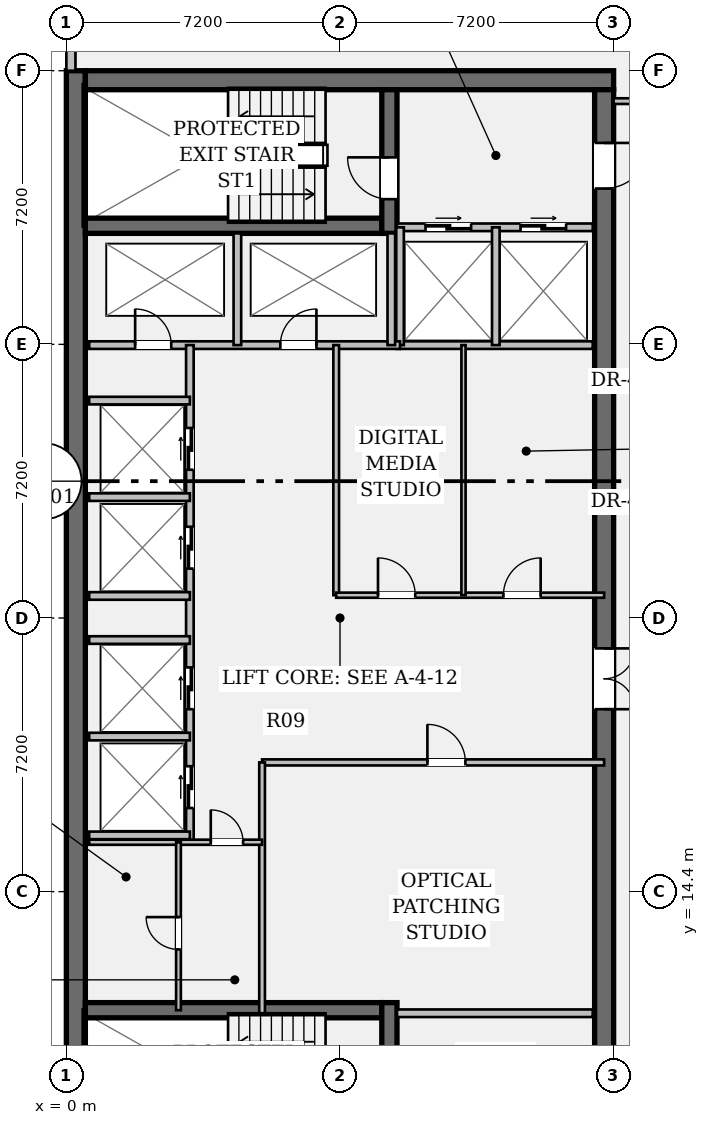
"""IFC4 building model, lengths in metres.
Left out: names, types, materials, properties, quantities, classifications, styles, units other than length and angle.
Written with IfcOpenShell. Run it as: python <this file> out.ifc"""

import sys

from ifc_helpers import new_model, si_unit, direction, frame, frame_2d, origin, place, context, subcontext, project, spatial, rectangle, extrude, element, fill, save


model = new_model("IFC4")
c1 = context("Model", 3, precision=1e-05, world=origin(), true_north=direction((0.0, 1.0)))
c2 = subcontext(c1, "Body", "Model", "MODEL_VIEW")
j1 = project(units=[si_unit("LENGTHUNIT", "METRE"), si_unit("PLANEANGLEUNIT", "RADIAN")], contexts=[c1])
p1 = place(None, origin())
s1 = spatial("IfcSite", under=j1, at=p1, CompositionType="ELEMENT")
p2 = place(p1, origin())
s2 = spatial("IfcBuilding", under=s1, at=p2, CompositionType="ELEMENT")
p3 = place(p2, frame((0.0, 0.0, 190.75)))
s3 = spatial("IfcBuildingStorey", under=s2, at=p3, CompositionType="ELEMENT", Elevation=190.75)
p4 = place(p3, frame((0.25, 7.2, 0.0), z_axis=(0.0, 0.0, 1.0), x_axis=(0.0, 1.0, 0.0)))
e1 = element("IfcWall", 1, at=p4, inside=s3, PredefinedType="SHEAR", context=c2, shape_type="SweptSolid", body=[
    extrude(rectangle(XDim=28.8, YDim=0.5, at=frame_2d((14.4, 0.0))), origin(), (0.0, 0.0, 1.0), 3.24),
])
p5 = place(p3, frame((0.5, 35.75, 0.0), z_axis=(0.0, 0.0, 1.0), x_axis=(1.0, 0.0, 0.0)))
e2 = element("IfcWall", 2, at=p5, inside=s3, PredefinedType="SHEAR", context=c2, shape_type="SweptSolid", body=[
    extrude(rectangle(XDim=13.9, YDim=0.5, at=frame_2d((6.95, 0.0))), origin(), (0.0, 0.0, 1.0), 3.24),
])
p6 = place(p3, frame((14.15, 35.5, 0.0), z_axis=(0.0, 0.0, 1.0), x_axis=(0.0, -1.0, 0.0)))
e3 = element("IfcWall", 3, at=p6, inside=s3, PredefinedType="SHEAR", context=c2, shape_type="SweptSolid", body=[
    extrude(rectangle(XDim=27.8, YDim=0.5, at=frame_2d((13.9, 0.0))), origin(), (0.0, 0.0, 1.0), 3.24),
])
p7 = place(p6, frame((1.4, 0.0, 0.0)))
e4 = element("IfcOpeningElement", 4, at=p7, cuts=e3, PredefinedType="OPENING", context=c2, shape_type="SweptSolid", body=[
    extrude(rectangle(XDim=1.2, YDim=2.15, at=frame_2d((0.6, 1.075))), frame((0.0, 0.262, 0.0), z_axis=(0.0, -1.0, 0.0), x_axis=(1.0, 0.0, 0.0)), (0.0, 0.0, 1.0), 0.524),
])
p8 = place(p6, frame((25.35, 0.0, 0.0)))
e5 = element("IfcOpeningElement", 5, at=p8, cuts=e3, PredefinedType="OPENING", context=c2, shape_type="SweptSolid", body=[
    extrude(rectangle(XDim=1.2, YDim=2.15, at=frame_2d((0.6, 1.075))), frame((0.0, 0.262, 0.0), z_axis=(0.0, -1.0, 0.0), x_axis=(1.0, 0.0, 0.0)), (0.0, 0.0, 1.0), 0.524),
])
p9 = place(p6, frame((14.7, 0.0, 0.0)))
e6 = element("IfcOpeningElement", 6, at=p9, cuts=e3, PredefinedType="OPENING", context=c2, shape_type="SweptSolid", body=[
    extrude(rectangle(XDim=1.6, YDim=2.2, at=frame_2d((0.8, 1.1))), frame((0.0, 0.262, 0.0), z_axis=(0.0, -1.0, 0.0), x_axis=(1.0, 0.0, 0.0)), (0.0, 0.0, 1.0), 0.524),
])
for number, where, z_axis, x_axis in (
    (7, (0.5, 31.92, 0.0), (0.0, 0.0, 1.0), (1.0, 0.0, 0.0)),
    (8, (0.5, 11.28, 0.0), (0.0, 0.0, 1.0), (1.0, 0.0, 0.0)),
):
    element("IfcWall", number, at=place(p3, frame(where, z_axis=z_axis, x_axis=x_axis)), inside=s3, PredefinedType="SHEAR", context=c2, shape_type="SweptSolid", body=[
        extrude(rectangle(XDim=7.8, YDim=0.4, at=frame_2d((3.9, 0.0))), origin(), (0.0, 0.0, 1.0), 3.24),
    ])
p10 = place(p3, frame((8.5, 31.72, 0.0), z_axis=(0.0, 0.0, 1.0), x_axis=(0.0, 1.0, 0.0)))
e9 = element("IfcWall", 9, at=p10, inside=s3, PredefinedType="SHEAR", context=c2, shape_type="SweptSolid", body=[
    extrude(rectangle(XDim=3.78, YDim=0.4, at=frame_2d((1.89, 0.0))), origin(), (0.0, 0.0, 1.0), 3.24),
])
p11 = place(p10, frame((0.9, 0.0, 0.0)))
e10 = element("IfcOpeningElement", 10, at=p11, cuts=e9, PredefinedType="OPENING", context=c2, shape_type="SweptSolid", body=[
    extrude(rectangle(XDim=1.1, YDim=2.15, at=frame_2d((0.55, 1.075))), frame((0.0, 0.212, 0.0), z_axis=(0.0, -1.0, 0.0), x_axis=(1.0, 0.0, 0.0)), (0.0, 0.0, 1.0), 0.424),
])
p12 = place(p3, frame((8.5, 7.7, 0.0), z_axis=(0.0, 0.0, 1.0), x_axis=(0.0, 1.0, 0.0)))
e11 = element("IfcWall", 11, at=p12, inside=s3, PredefinedType="SHEAR", context=c2, shape_type="SweptSolid", body=[
    extrude(rectangle(XDim=3.78, YDim=0.4, at=frame_2d((1.89, 0.0))), origin(), (0.0, 0.0, 1.0), 3.24),
])
p13 = place(p12, frame((0.85, 0.0, 0.0)))
e12 = element("IfcOpeningElement", 12, at=p13, cuts=e11, PredefinedType="OPENING", context=c2, shape_type="SweptSolid", body=[
    extrude(rectangle(XDim=1.1, YDim=2.15, at=frame_2d((0.55, 1.075))), frame((0.0, 0.212, 0.0), z_axis=(0.0, -1.0, 0.0), x_axis=(1.0, 0.0, 0.0)), (0.0, 0.0, 1.0), 0.424),
])
p14 = place(p3, frame((0.12, 36.0, 0.0), z_axis=(0.0, 0.0, 1.0), x_axis=(0.0, 1.0, 0.0)))
e13 = element("IfcWall", 13, at=p14, inside=s3, PredefinedType="STANDARD", context=c2, shape_type="SweptSolid", body=[
    extrude(rectangle(XDim=1.33, YDim=0.24, at=frame_2d((0.665, 0.0))), origin(), (0.0, 0.0, 1.0), 3.24),
])
p15 = place(p3, frame((8.7, 31.88, 0.0), z_axis=(0.0, 0.0, 1.0), x_axis=(1.0, 0.0, 0.0)))
e14 = element("IfcWall", 14, at=p15, inside=s3, PredefinedType="PARTITIONING", context=c2, shape_type="SweptSolid", body=[
    extrude(rectangle(XDim=5.15, YDim=0.2, at=frame_2d((2.575, 0.0))), origin(), (0.0, 0.0, 1.0), 3.24),
])
p16 = place(p15, frame((0.75, 0.0, 0.0)))
e15 = element("IfcOpeningElement", 15, at=p16, cuts=e14, PredefinedType="OPENING", context=c2, shape_type="SweptSolid", body=[
    extrude(rectangle(XDim=1.2, YDim=2.2, at=frame_2d((0.6, 1.1))), frame((0.0, 0.112, 0.0), z_axis=(0.0, -1.0, 0.0), x_axis=(1.0, 0.0, 0.0)), (0.0, 0.0, 1.0), 0.224),
])
p17 = place(p15, frame((3.25, 0.0, 0.0)))
e16 = element("IfcOpeningElement", 16, at=p17, cuts=e14, PredefinedType="OPENING", context=c2, shape_type="SweptSolid", body=[
    extrude(rectangle(XDim=1.2, YDim=2.2, at=frame_2d((0.6, 1.1))), frame((0.0, 0.112, 0.0), z_axis=(0.0, -1.0, 0.0), x_axis=(1.0, 0.0, 0.0)), (0.0, 0.0, 1.0), 0.224),
])
for number, where, z_axis, x_axis in (
    (17, (8.7, 11.2, 0.0), (0.0, 0.0, 1.0), (1.0, 0.0, 0.0)),
    (18, (8.7, 28.78, 0.0), (0.0, 0.0, 1.0), (1.0, 0.0, 0.0)),
):
    element("IfcWall", number, at=place(p3, frame(where, z_axis=z_axis, x_axis=x_axis)), inside=s3, PredefinedType="PARTITIONING", context=c2, shape_type="SweptSolid", body=[
        extrude(rectangle(XDim=5.15, YDim=0.2, at=frame_2d((2.575, 0.0))), origin(), (0.0, 0.0, 1.0), 3.24),
    ])
for number, where, z_axis, x_axis in (
    (19, (8.78, 28.78, 0.0), (0.0, 0.0, 1.0), (0.0, 1.0, 0.0)),
    (20, (11.3, 28.78, 0.0), (0.0, 0.0, 1.0), (0.0, 1.0, 0.0)),
):
    element("IfcWall", number, at=place(p3, frame(where, z_axis=z_axis, x_axis=x_axis)), inside=s3, PredefinedType="PARTITIONING", context=c2, shape_type="SweptSolid", body=[
        extrude(rectangle(XDim=3.1, YDim=0.2, at=frame_2d((1.55, 0.0))), origin(), (0.0, 0.0, 1.0), 3.24),
    ])
p18 = place(p3, frame((0.6, 28.78, 0.0), z_axis=(0.0, 0.0, 1.0), x_axis=(1.0, 0.0, 0.0)))
e21 = element("IfcWall", 21, at=p18, inside=s3, PredefinedType="PARTITIONING", context=c2, shape_type="SweptSolid", body=[
    extrude(rectangle(XDim=8.18, YDim=0.2, at=frame_2d((4.09, 0.0))), origin(), (0.0, 0.0, 1.0), 3.24),
])
p19 = place(p18, frame((1.21, 0.0, 0.0)))
e22 = element("IfcOpeningElement", 22, at=p19, cuts=e21, PredefinedType="OPENING", context=c2, shape_type="SweptSolid", body=[
    extrude(rectangle(XDim=0.95, YDim=2.15, at=frame_2d((0.475, 1.075))), frame((0.0, 0.112, 0.0), z_axis=(0.0, -1.0, 0.0), x_axis=(1.0, 0.0, 0.0)), (0.0, 0.0, 1.0), 0.224),
])
p20 = place(p18, frame((5.03, 0.0, 0.0)))
e23 = element("IfcOpeningElement", 23, at=p20, cuts=e21, PredefinedType="OPENING", context=c2, shape_type="SweptSolid", body=[
    extrude(rectangle(XDim=0.95, YDim=2.15, at=frame_2d((0.475, 1.075))), frame((0.0, 0.112, 0.0), z_axis=(0.0, -1.0, 0.0), x_axis=(1.0, 0.0, 0.0)), (0.0, 0.0, 1.0), 0.224),
])
for number, where, z_axis, x_axis in (
    (24, (4.5, 28.78, 0.0), (0.0, 0.0, 1.0), (0.0, 1.0, 0.0)),
    (25, (8.55, 28.78, 0.0), (0.0, 0.0, 1.0), (0.0, 1.0, 0.0)),
):
    element("IfcWall", number, at=place(p3, frame(where, z_axis=z_axis, x_axis=x_axis)), inside=s3, PredefinedType="PARTITIONING", context=c2, shape_type="SweptSolid", body=[
        extrude(rectangle(XDim=2.94, YDim=0.2, at=frame_2d((1.47, 0.0))), origin(), (0.0, 0.0, 1.0), 3.24),
    ])
p21 = place(p3, frame((3.25, 15.7, 0.0), z_axis=(0.0, 0.0, 1.0), x_axis=(0.0, 1.0, 0.0)))
e26 = element("IfcWall", 26, at=p21, inside=s3, PredefinedType="PARTITIONING", context=c2, shape_type="SweptSolid", body=[
    extrude(rectangle(XDim=13.08, YDim=0.2, at=frame_2d((6.54, 0.0))), origin(), (0.0, 0.0, 1.0), 3.24),
])
p22 = place(p21, frame((0.9, 0.0, 0.0)))
e27 = element("IfcOpeningElement", 27, at=p22, cuts=e26, PredefinedType="OPENING", context=c2, shape_type="SweptSolid", body=[
    extrude(rectangle(XDim=1.1, YDim=2.2, at=frame_2d((0.55, 1.1))), frame((0.0, 0.112, 0.0), z_axis=(0.0, -1.0, 0.0), x_axis=(1.0, 0.0, 0.0)), (0.0, 0.0, 1.0), 0.224),
])
p23 = place(p21, frame((3.5, 0.0, 0.0)))
e28 = element("IfcOpeningElement", 28, at=p23, cuts=e26, PredefinedType="OPENING", context=c2, shape_type="SweptSolid", body=[
    extrude(rectangle(XDim=1.1, YDim=2.2, at=frame_2d((0.55, 1.1))), frame((0.0, 0.112, 0.0), z_axis=(0.0, -1.0, 0.0), x_axis=(1.0, 0.0, 0.0)), (0.0, 0.0, 1.0), 0.224),
])
p24 = place(p21, frame((7.2, 0.0, 0.0)))
e29 = element("IfcOpeningElement", 29, at=p24, cuts=e26, PredefinedType="OPENING", context=c2, shape_type="SweptSolid", body=[
    extrude(rectangle(XDim=1.1, YDim=2.2, at=frame_2d((0.55, 1.1))), frame((0.0, 0.112, 0.0), z_axis=(0.0, -1.0, 0.0), x_axis=(1.0, 0.0, 0.0)), (0.0, 0.0, 1.0), 0.224),
])
p25 = place(p21, frame((9.8, 0.0, 0.0)))
e30 = element("IfcOpeningElement", 30, at=p25, cuts=e26, PredefinedType="OPENING", context=c2, shape_type="SweptSolid", body=[
    extrude(rectangle(XDim=1.1, YDim=2.2, at=frame_2d((0.55, 1.1))), frame((0.0, 0.112, 0.0), z_axis=(0.0, -1.0, 0.0), x_axis=(1.0, 0.0, 0.0)), (0.0, 0.0, 1.0), 0.224),
])
for number, where, z_axis, x_axis in (
    (31, (0.6, 15.88, 0.0), (0.0, 0.0, 1.0), (1.0, 0.0, 0.0)),
    (32, (0.6, 18.48, 0.0), (0.0, 0.0, 1.0), (1.0, 0.0, 0.0)),
    (33, (0.6, 22.18, 0.0), (0.0, 0.0, 1.0), (1.0, 0.0, 0.0)),
    (34, (0.6, 24.78, 0.0), (0.0, 0.0, 1.0), (1.0, 0.0, 0.0)),
    (35, (0.6, 21.02, 0.0), (0.0, 0.0, 1.0), (1.0, 0.0, 0.0)),
    (36, (0.6, 27.32, 0.0), (0.0, 0.0, 1.0), (1.0, 0.0, 0.0)),
):
    element("IfcWall", number, at=place(p3, frame(where, z_axis=z_axis, x_axis=x_axis)), inside=s3, PredefinedType="PARTITIONING", context=c2, shape_type="SweptSolid", body=[
        extrude(rectangle(XDim=2.65, YDim=0.2, at=frame_2d((1.325, 0.0))), origin(), (0.0, 0.0, 1.0), 3.24),
    ])
p26 = place(p3, frame((7.1, 22.2, 0.0), z_axis=(0.0, 0.0, 1.0), x_axis=(0.0, 1.0, 0.0)))
e37 = element("IfcWall", 37, at=p26, inside=s3, PredefinedType="PARTITIONING", context=c2, shape_type="SweptSolid", body=[
    extrude(rectangle(XDim=6.58, YDim=0.15, at=frame_2d((3.29, 0.0))), origin(), (0.0, 0.0, 1.0), 3.24),
])
p27 = place(p3, frame((7.1, 22.2, 0.0), z_axis=(0.0, 0.0, 1.0), x_axis=(1.0, 0.0, 0.0)))
e38 = element("IfcWall", 38, at=p27, inside=s3, PredefinedType="PARTITIONING", context=c2, shape_type="SweptSolid", body=[
    extrude(rectangle(XDim=7.05, YDim=0.135, at=frame_2d((3.525, 0.0))), origin(), (0.0, 0.0, 1.0), 3.24),
])
p28 = place(p27, frame((1.1, 0.0, 0.0)))
e39 = element("IfcOpeningElement", 39, at=p28, cuts=e38, PredefinedType="OPENING", context=c2, shape_type="SweptSolid", body=[
    extrude(rectangle(XDim=0.98, YDim=2.15, at=frame_2d((0.49, 1.075))), frame((0.0, 0.08, 0.0), z_axis=(0.0, -1.0, 0.0), x_axis=(1.0, 0.0, 0.0)), (0.0, 0.0, 1.0), 0.159),
])
p29 = place(p27, frame((4.4, 0.0, 0.0)))
e40 = element("IfcOpeningElement", 40, at=p29, cuts=e38, PredefinedType="OPENING", context=c2, shape_type="SweptSolid", body=[
    extrude(rectangle(XDim=0.98, YDim=2.15, at=frame_2d((0.49, 1.075))), frame((0.0, 0.08, 0.0), z_axis=(0.0, -1.0, 0.0), x_axis=(1.0, 0.0, 0.0)), (0.0, 0.0, 1.0), 0.159),
])
p30 = place(p3, frame((10.45, 22.2, 0.0), z_axis=(0.0, 0.0, 1.0), x_axis=(0.0, 1.0, 0.0)))
e41 = element("IfcWall", 41, at=p30, inside=s3, PredefinedType="PARTITIONING", context=c2, shape_type="SweptSolid", body=[
    extrude(rectangle(XDim=6.58, YDim=0.11, at=frame_2d((3.29, 0.0))), origin(), (0.0, 0.0, 1.0), 3.24),
])
p31 = place(p3, frame((5.15, 17.8, 0.0), z_axis=(0.0, 0.0, 1.0), x_axis=(1.0, 0.0, 0.0)))
e42 = element("IfcWall", 42, at=p31, inside=s3, PredefinedType="PARTITIONING", context=c2, shape_type="SweptSolid", body=[
    extrude(rectangle(XDim=9.0, YDim=0.16, at=frame_2d((4.5, 0.0))), origin(), (0.0, 0.0, 1.0), 3.24),
])
p32 = place(p31, frame((4.35, 0.0, 0.0)))
e43 = element("IfcOpeningElement", 43, at=p32, cuts=e42, PredefinedType="OPENING", context=c2, shape_type="SweptSolid", body=[
    extrude(rectangle(XDim=1.0, YDim=2.15, at=frame_2d((0.5, 1.075))), frame((0.0, 0.092, 0.0), z_axis=(0.0, -1.0, 0.0), x_axis=(1.0, 0.0, 0.0)), (0.0, 0.0, 1.0), 0.184),
])
p33 = place(p3, frame((5.15, 11.2, 0.0), z_axis=(0.0, 0.0, 1.0), x_axis=(0.0, 1.0, 0.0)))
e44 = element("IfcWall", 44, at=p33, inside=s3, PredefinedType="PARTITIONING", context=c2, shape_type="SweptSolid", body=[
    extrude(rectangle(XDim=6.6, YDim=0.15, at=frame_2d((3.3, 0.0))), origin(), (0.0, 0.0, 1.0), 3.24),
])
p34 = place(p3, frame((0.6, 15.7, 0.0), z_axis=(0.0, 0.0, 1.0), x_axis=(1.0, 0.0, 0.0)))
e45 = element("IfcWall", 45, at=p34, inside=s3, PredefinedType="PARTITIONING", context=c2, shape_type="SweptSolid", body=[
    extrude(rectangle(XDim=4.55, YDim=0.135, at=frame_2d((2.275, 0.0))), origin(), (0.0, 0.0, 1.0), 3.24),
])
p35 = place(p34, frame((3.2, 0.0, 0.0)))
e46 = element("IfcOpeningElement", 46, at=p35, cuts=e45, PredefinedType="OPENING", context=c2, shape_type="SweptSolid", body=[
    extrude(rectangle(XDim=0.85, YDim=2.15, at=frame_2d((0.425, 1.075))), frame((0.0, 0.08, 0.0), z_axis=(0.0, -1.0, 0.0), x_axis=(1.0, 0.0, 0.0)), (0.0, 0.0, 1.0), 0.159),
])
p36 = place(p3, frame((2.95, 11.28, 0.0), z_axis=(0.0, 0.0, 1.0), x_axis=(0.0, 1.0, 0.0)))
e47 = element("IfcWall", 47, at=p36, inside=s3, PredefinedType="PARTITIONING", context=c2, shape_type="SweptSolid", body=[
    extrude(rectangle(XDim=4.42, YDim=0.125, at=frame_2d((2.21, 0.0))), origin(), (0.0, 0.0, 1.0), 3.24),
])
p37 = place(p36, frame((1.6, 0.0, 0.0)))
e48 = element("IfcOpeningElement", 48, at=p37, cuts=e47, PredefinedType="OPENING", context=c2, shape_type="SweptSolid", body=[
    extrude(rectangle(XDim=0.85, YDim=2.15, at=frame_2d((0.425, 1.075))), frame((0.0, 0.074, 0.0), z_axis=(0.0, -1.0, 0.0), x_axis=(1.0, 0.0, 0.0)), (0.0, 0.0, 1.0), 0.149),
])
p38 = place(p3, frame((14.4, 35.2, 0.0), z_axis=(0.0, 0.0, 1.0), x_axis=(1.0, 0.0, 0.0)))
e49 = element("IfcWall", 49, at=p38, inside=s3, PredefinedType="PARTITIONING", context=c2, shape_type="SweptSolid", body=[
    extrude(rectangle(XDim=2.95, YDim=0.15, at=frame_2d((1.475, 0.0))), origin(), (0.0, 0.0, 1.0), 2.808),
])
p39 = place(p38, frame((0.95, 0.0, 0.0)))
e50 = element("IfcOpeningElement", 50, at=p39, cuts=e49, PredefinedType="OPENING", context=c2, shape_type="SweptSolid", body=[
    extrude(rectangle(XDim=1.0, YDim=2.15, at=frame_2d((0.5, 1.075))), frame((0.0, 0.087, 0.0), z_axis=(0.0, -1.0, 0.0), x_axis=(1.0, 0.0, 0.0)), (0.0, 0.0, 1.0), 0.174),
])
p40 = place(p11, origin())
e51 = element("IfcDoor", 51, at=p40, inside=s3, OperationType="SINGLE_SWING_RIGHT", PredefinedType="DOOR", context=c2, shape_type="SweptSolid", body=[
    extrude(rectangle(XDim=1.1, YDim=2.15, at=frame_2d((0.55, 1.075))), frame((0.0, 0.025, 0.0), z_axis=(0.0, -1.0, 0.0), x_axis=(1.0, 0.0, 0.0)), (0.0, 0.0, 1.0), 0.05),
])
fill(e10, e51)
p41 = place(p7, origin())
e52 = element("IfcDoor", 52, at=p41, inside=s3, OperationType="SINGLE_SWING_LEFT", PredefinedType="DOOR", context=c2, shape_type="SweptSolid", body=[
    extrude(rectangle(XDim=1.2, YDim=2.15, at=frame_2d((0.6, 1.075))), frame((0.0, 0.025, 0.0), z_axis=(0.0, -1.0, 0.0), x_axis=(1.0, 0.0, 0.0)), (0.0, 0.0, 1.0), 0.05),
])
fill(e4, e52)
p42 = place(p16, origin())
e53 = element("IfcDoor", 53, at=p42, inside=s3, OperationType="DOUBLE_DOOR_SLIDING", PredefinedType="DOOR", context=c2, shape_type="SweptSolid", body=[
    extrude(rectangle(XDim=1.2, YDim=2.2, at=frame_2d((0.6, 1.1))), frame((0.0, 0.025, 0.0), z_axis=(0.0, -1.0, 0.0), x_axis=(1.0, 0.0, 0.0)), (0.0, 0.0, 1.0), 0.05),
])
fill(e15, e53)
p43 = place(p17, origin())
e54 = element("IfcDoor", 54, at=p43, inside=s3, OperationType="DOUBLE_DOOR_SLIDING", PredefinedType="DOOR", context=c2, shape_type="SweptSolid", body=[
    extrude(rectangle(XDim=1.2, YDim=2.2, at=frame_2d((0.6, 1.1))), frame((0.0, 0.025, 0.0), z_axis=(0.0, -1.0, 0.0), x_axis=(1.0, 0.0, 0.0)), (0.0, 0.0, 1.0), 0.05),
])
fill(e16, e54)
p44 = place(p19, origin())
e55 = element("IfcDoor", 55, at=p44, inside=s3, OperationType="SINGLE_SWING_LEFT", PredefinedType="DOOR", context=c2, shape_type="SweptSolid", body=[
    extrude(rectangle(XDim=0.95, YDim=2.15, at=frame_2d((0.475, 1.075))), frame((0.0, 0.025, 0.0), z_axis=(0.0, -1.0, 0.0), x_axis=(1.0, 0.0, 0.0)), (0.0, 0.0, 1.0), 0.05),
])
fill(e22, e55)
p45 = place(p20, origin())
e56 = element("IfcDoor", 56, at=p45, inside=s3, OperationType="SINGLE_SWING_RIGHT", PredefinedType="DOOR", context=c2, shape_type="SweptSolid", body=[
    extrude(rectangle(XDim=0.95, YDim=2.15, at=frame_2d((0.475, 1.075))), frame((0.0, 0.025, 0.0), z_axis=(0.0, -1.0, 0.0), x_axis=(1.0, 0.0, 0.0)), (0.0, 0.0, 1.0), 0.05),
])
fill(e23, e56)
p46 = place(p9, origin())
e57 = element("IfcDoor", 57, at=p46, inside=s3, OperationType="DOUBLE_DOOR_SINGLE_SWING", PredefinedType="DOOR", context=c2, shape_type="SweptSolid", body=[
    extrude(rectangle(XDim=1.6, YDim=2.2, at=frame_2d((0.8, 1.1))), frame((0.0, 0.025, 0.0), z_axis=(0.0, -1.0, 0.0), x_axis=(1.0, 0.0, 0.0)), (0.0, 0.0, 1.0), 0.05),
])
fill(e6, e57)
p47 = place(p22, origin())
e58 = element("IfcDoor", 58, at=p47, inside=s3, OperationType="DOUBLE_DOOR_SLIDING", PredefinedType="DOOR", context=c2, shape_type="SweptSolid", body=[
    extrude(rectangle(XDim=1.1, YDim=2.2, at=frame_2d((0.55, 1.1))), frame((0.0, 0.025, 0.0), z_axis=(0.0, -1.0, 0.0), x_axis=(1.0, 0.0, 0.0)), (0.0, 0.0, 1.0), 0.05),
])
fill(e27, e58)
p48 = place(p23, origin())
e59 = element("IfcDoor", 59, at=p48, inside=s3, OperationType="DOUBLE_DOOR_SLIDING", PredefinedType="DOOR", context=c2, shape_type="SweptSolid", body=[
    extrude(rectangle(XDim=1.1, YDim=2.2, at=frame_2d((0.55, 1.1))), frame((0.0, 0.025, 0.0), z_axis=(0.0, -1.0, 0.0), x_axis=(1.0, 0.0, 0.0)), (0.0, 0.0, 1.0), 0.05),
])
fill(e28, e59)
p49 = place(p24, origin())
e60 = element("IfcDoor", 60, at=p49, inside=s3, OperationType="DOUBLE_DOOR_SLIDING", PredefinedType="DOOR", context=c2, shape_type="SweptSolid", body=[
    extrude(rectangle(XDim=1.1, YDim=2.2, at=frame_2d((0.55, 1.1))), frame((0.0, 0.025, 0.0), z_axis=(0.0, -1.0, 0.0), x_axis=(1.0, 0.0, 0.0)), (0.0, 0.0, 1.0), 0.05),
])
fill(e29, e60)
p50 = place(p25, origin())
e61 = element("IfcDoor", 61, at=p50, inside=s3, OperationType="DOUBLE_DOOR_SLIDING", PredefinedType="DOOR", context=c2, shape_type="SweptSolid", body=[
    extrude(rectangle(XDim=1.1, YDim=2.2, at=frame_2d((0.55, 1.1))), frame((0.0, 0.025, 0.0), z_axis=(0.0, -1.0, 0.0), x_axis=(1.0, 0.0, 0.0)), (0.0, 0.0, 1.0), 0.05),
])
fill(e30, e61)
p51 = place(p28, origin())
e62 = element("IfcDoor", 62, at=p51, inside=s3, OperationType="SINGLE_SWING_LEFT", PredefinedType="DOOR", context=c2, shape_type="SweptSolid", body=[
    extrude(rectangle(XDim=0.98, YDim=2.15, at=frame_2d((0.49, 1.075))), frame((0.0, 0.025, 0.0), z_axis=(0.0, -1.0, 0.0), x_axis=(1.0, 0.0, 0.0)), (0.0, 0.0, 1.0), 0.05),
])
fill(e39, e62)
p52 = place(p29, origin())
e63 = element("IfcDoor", 63, at=p52, inside=s3, OperationType="SINGLE_SWING_RIGHT", PredefinedType="DOOR", context=c2, shape_type="SweptSolid", body=[
    extrude(rectangle(XDim=0.98, YDim=2.15, at=frame_2d((0.49, 1.075))), frame((0.0, 0.025, 0.0), z_axis=(0.0, -1.0, 0.0), x_axis=(1.0, 0.0, 0.0)), (0.0, 0.0, 1.0), 0.05),
])
fill(e40, e63)
p53 = place(p32, origin())
e64 = element("IfcDoor", 64, at=p53, inside=s3, OperationType="SINGLE_SWING_LEFT", PredefinedType="DOOR", context=c2, shape_type="SweptSolid", body=[
    extrude(rectangle(XDim=1.0, YDim=2.15, at=frame_2d((0.5, 1.075))), frame((0.0, 0.025, 0.0), z_axis=(0.0, -1.0, 0.0), x_axis=(1.0, 0.0, 0.0)), (0.0, 0.0, 1.0), 0.05),
])
fill(e43, e64)
p54 = place(p35, origin())
e65 = element("IfcDoor", 65, at=p54, inside=s3, OperationType="SINGLE_SWING_LEFT", PredefinedType="DOOR", context=c2, shape_type="SweptSolid", body=[
    extrude(rectangle(XDim=0.85, YDim=2.15, at=frame_2d((0.425, 1.075))), frame((0.0, 0.025, 0.0), z_axis=(0.0, -1.0, 0.0), x_axis=(1.0, 0.0, 0.0)), (0.0, 0.0, 1.0), 0.05),
])
fill(e46, e65)
p55 = place(p37, origin())
e66 = element("IfcDoor", 66, at=p55, inside=s3, OperationType="SINGLE_SWING_RIGHT", PredefinedType="DOOR", context=c2, shape_type="SweptSolid", body=[
    extrude(rectangle(XDim=0.85, YDim=2.15, at=frame_2d((0.425, 1.075))), frame((0.0, 0.025, 0.0), z_axis=(0.0, -1.0, 0.0), x_axis=(1.0, 0.0, 0.0)), (0.0, 0.0, 1.0), 0.05),
])
fill(e48, e66)
save(model, sys.argv[1])
